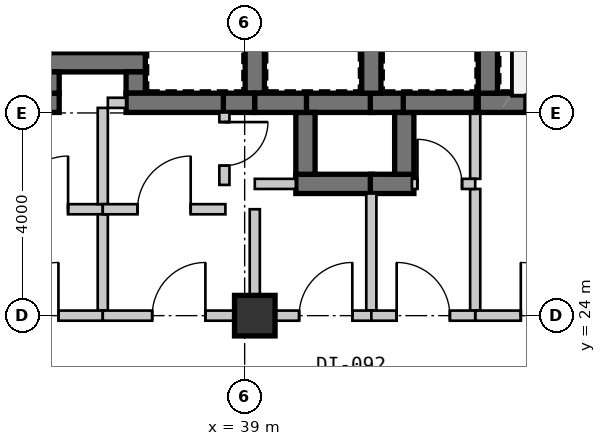
"""IFC4 building model, lengths in metres.
Left out: names, types, materials, properties, quantities, classifications, styles, units other than length and angle.
Written with IfcOpenShell. Run it as: python <this file> out.ifc"""

import sys

from ifc_helpers import new_model, si_unit, direction, frame, frame_2d, origin, origin_2d, place, context, subcontext, project, spatial, rectangle, extrude, source, transform, mapped, element, fill, save


model = new_model("IFC4")
c1 = context("Model", 3, precision=1e-05, world=origin(), true_north=direction((0.0, 1.0)))
c2 = subcontext(c1, "Body", "Model", "MODEL_VIEW")
j1 = project(units=[si_unit("LENGTHUNIT", "METRE"), si_unit("PLANEANGLEUNIT", "RADIAN")], contexts=[c1])
p1 = place(None, origin())
s1 = spatial("IfcSite", under=j1, at=p1, CompositionType="ELEMENT")
p2 = place(p1, origin())
s2 = spatial("IfcBuilding", under=s1, at=p2, CompositionType="ELEMENT")
p3 = place(p2, frame((0.0, 0.0, 26.25)))
s3 = spatial("IfcBuildingStorey", under=s2, at=p3, CompositionType="ELEMENT", Elevation=26.25)
m1 = source(origin(), c2, "Body", "SweptSolid", [
    extrude(rectangle(XDim=0.8, YDim=0.8, at=origin_2d()), origin(), (0.0, 0.0, 1.0), 3.15),
])
p4 = place(p3, frame((39.2, 24.0, 0.0), z_axis=(0.0, 0.0, 1.0), x_axis=(1.0, 0.0, 0.0)))
e1 = element("IfcColumn", 1, at=p4, inside=s3, PredefinedType="COLUMN", context=c2, shape_type="MappedRepresentation", body=[
    mapped(m1, transform((0.0, 0.0, 0.0), scale=1.0)),
])
m2 = source(origin(), c2, "Body", "SweptSolid", [
    extrude(rectangle(XDim=2.98, YDim=0.38, at=frame_2d((1.49, 0.0))), origin(), (0.0, 0.0, 1.0), 2.93),
])
p5 = place(p3, frame((43.61, 28.2, 0.0), z_axis=(0.0, 0.0, 1.0), x_axis=(1.0, 0.0, 0.0)))
e2 = element("IfcWall", 2, at=p5, inside=s3, PredefinedType="SHEAR", context=c2, shape_type="MappedRepresentation", body=[
    mapped(m2, transform((0.0, 0.0, 0.0), scale=1.0)),
])
m3 = source(origin(), c2, "Body", "SweptSolid", [
    extrude(rectangle(XDim=1.1, YDim=2.15, at=frame_2d((0.55, 1.075))), frame((0.0, 0.2, 0.0), z_axis=(0.0, -1.0, 0.0), x_axis=(1.0, 0.0, 0.0)), (0.0, 0.0, 1.0), 0.4),
])
p6 = place(p5, frame((0.94, 0.0, 0.0)))
e3 = element("IfcOpeningElement", 3, at=p6, cuts=e2, PredefinedType="OPENING", context=c2, shape_type="MappedRepresentation", body=[
    mapped(m3, transform((0.0, 0.0, 0.0), scale=1.0)),
])
m4 = source(origin(), c2, "Body", "SweptSolid", [
    extrude(rectangle(XDim=3.42, YDim=0.38, at=frame_2d((1.71, 0.0))), origin(), (0.0, 0.0, 1.0), 2.93),
])
p7 = place(p3, frame((43.8, 31.81, 0.0), z_axis=(0.0, 0.0, 1.0), x_axis=(0.0, -1.0, 0.0)))
e4 = element("IfcWall", 4, at=p7, inside=s3, PredefinedType="SHEAR", context=c2, shape_type="MappedRepresentation", body=[
    mapped(m4, transform((0.0, 0.0, 0.0), scale=1.0)),
])
m5 = source(origin(), c2, "Body", "SweptSolid", [
    extrude(rectangle(XDim=2.4, YDim=0.2, at=frame_2d((1.2, 0.0))), origin(), (0.0, 0.0, 1.0), 2.93),
])
p8 = place(p3, frame((43.55, 26.5, 0.0), z_axis=(0.0, 0.0, 1.0), x_axis=(0.0, -1.0, 0.0)))
e5 = element("IfcWall", 5, at=p8, inside=s3, PredefinedType="SOLIDWALL", context=c2, shape_type="MappedRepresentation", body=[
    mapped(m5, transform((0.0, 0.0, 0.0), scale=1.0)),
])
m6 = source(origin(), c2, "Body", "SweptSolid", [
    extrude(rectangle(XDim=1.31, YDim=0.2, at=frame_2d((0.655, 0.0))), origin(), (0.0, 0.0, 1.0), 2.93),
])
p9 = place(p3, frame((43.55, 28.01, 0.0), z_axis=(0.0, 0.0, 1.0), x_axis=(0.0, -1.0, 0.0)))
e6 = element("IfcWall", 6, at=p9, inside=s3, PredefinedType="SOLIDWALL", context=c2, shape_type="MappedRepresentation", body=[
    mapped(m6, transform((0.0, 0.0, 0.0), scale=1.0)),
])
m7 = source(origin(), c2, "Body", "SweptSolid", [
    extrude(rectangle(XDim=2.66, YDim=0.2, at=frame_2d((1.33, 0.0))), origin(), (0.0, 0.0, 1.0), 2.397),
])
p10 = place(p3, frame((43.55, 24.0, 0.0), z_axis=(0.0, 0.0, 1.0), x_axis=(1.0, 0.0, 0.0)))
e7 = element("IfcWall", 7, at=p10, inside=s3, PredefinedType="SOLIDWALL", context=c2, shape_type="MappedRepresentation", body=[
    mapped(m7, transform((0.0, 0.0, 0.0), scale=1.0)),
])
m8 = source(origin(), c2, "Body", "SweptSolid", [
    extrude(rectangle(XDim=1.05, YDim=2.1, at=frame_2d((0.525, 1.05))), frame((0.0, 0.11, 0.0), z_axis=(0.0, -1.0, 0.0), x_axis=(1.0, 0.0, 0.0)), (0.0, 0.0, 1.0), 0.22),
])
p11 = place(p10, frame((0.9, 0.0, 0.0)))
e8 = element("IfcOpeningElement", 8, at=p11, cuts=e7, PredefinedType="OPENING", context=c2, shape_type="MappedRepresentation", body=[
    mapped(m8, transform((0.0, 0.0, 0.0), scale=1.0)),
])
m9 = source(origin(), c2, "Body", "SweptSolid", [
    extrude(rectangle(XDim=1.12, YDim=0.38, at=frame_2d((0.56, 0.0))), origin(), (0.0, 0.0, 1.0), 2.93),
])
for number, where, z_axis, x_axis in (
    (9, (35.15, 30.31, 0.0), (0.0, 0.0, 1.0), (0.0, -1.0, 0.0)),
    (10, (36.85, 29.19, 0.0), (0.0, 0.0, 1.0), (0.0, 1.0, 0.0)),
):
    element("IfcWall", number, at=place(p3, frame(where, z_axis=z_axis, x_axis=x_axis)), inside=s3, PredefinedType="SHEAR", context=c2, shape_type="MappedRepresentation", body=[
        mapped(m9, transform((0.0, 0.0, 0.0), scale=1.0)),
    ])
m10 = source(origin(), c2, "Body", "SweptSolid", [
    extrude(rectangle(XDim=2.08, YDim=0.38, at=frame_2d((1.04, 0.0))), origin(), (0.0, 0.0, 1.0), 2.93),
])
p12 = place(p3, frame((34.96, 29.0, 0.0), z_axis=(0.0, 0.0, 1.0), x_axis=(1.0, 0.0, 0.0)))
e11 = element("IfcWall", 11, at=p12, inside=s3, PredefinedType="SHEAR", context=c2, shape_type="MappedRepresentation", body=[
    mapped(m10, transform((0.0, 0.0, 0.0), scale=1.0)),
])
m11 = source(origin(), c2, "Body", "SweptSolid", [
    extrude(rectangle(XDim=1.32, YDim=0.38, at=frame_2d((0.66, 0.0))), origin(), (0.0, 0.0, 1.0), 2.93),
])
p13 = place(p3, frame((41.52, 28.2, 0.0), z_axis=(0.0, 0.0, 1.0), x_axis=(-1.0, 0.0, 0.0)))
e12 = element("IfcWall", 12, at=p13, inside=s3, PredefinedType="SHEAR", context=c2, shape_type="MappedRepresentation", body=[
    mapped(m11, transform((0.0, 0.0, 0.0), scale=1.0)),
])
m12 = source(origin(), c2, "Body", "SweptSolid", [
    extrude(rectangle(XDim=0.67, YDim=0.38, at=frame_2d((0.335, 0.0))), origin(), (0.0, 0.0, 1.0), 2.93),
])
p14 = place(p3, frame((42.15, 28.2, 0.0), z_axis=(0.0, 0.0, 1.0), x_axis=(-1.0, 0.0, 0.0)))
e13 = element("IfcWall", 13, at=p14, inside=s3, PredefinedType="SHEAR", context=c2, shape_type="MappedRepresentation", body=[
    mapped(m12, transform((0.0, 0.0, 0.0), scale=1.0)),
])
m13 = source(origin(), c2, "Body", "SweptSolid", [
    extrude(rectangle(XDim=1.51, YDim=0.38, at=frame_2d((0.755, 0.0))), origin(), (0.0, 0.0, 1.0), 2.93),
])
p15 = place(p3, frame((40.01, 26.6, 0.0), z_axis=(0.0, 0.0, 1.0), x_axis=(1.0, 0.0, 0.0)))
e14 = element("IfcWall", 14, at=p15, inside=s3, PredefinedType="SHEAR", context=c2, shape_type="MappedRepresentation", body=[
    mapped(m13, transform((0.0, 0.0, 0.0), scale=1.0)),
])
m14 = source(origin(), c2, "Body", "SweptSolid", [
    extrude(rectangle(XDim=1.22, YDim=0.38, at=frame_2d((0.61, 0.0))), origin(), (0.0, 0.0, 1.0), 2.93),
])
p16 = place(p3, frame((40.2, 28.01, 0.0), z_axis=(0.0, 0.0, 1.0), x_axis=(0.0, -1.0, 0.0)))
e15 = element("IfcWall", 15, at=p16, inside=s3, PredefinedType="SHEAR", context=c2, shape_type="MappedRepresentation", body=[
    mapped(m14, transform((0.0, 0.0, 0.0), scale=1.0)),
])
m15 = source(origin(), c2, "Body", "SweptSolid", [
    extrude(rectangle(XDim=0.86, YDim=0.38, at=frame_2d((0.43, 0.0))), origin(), (0.0, 0.0, 1.0), 2.93),
])
p17 = place(p3, frame((41.48, 26.6, 0.0), z_axis=(0.0, 0.0, 1.0), x_axis=(1.0, 0.0, 0.0)))
e16 = element("IfcWall", 16, at=p17, inside=s3, PredefinedType="SHEAR", context=c2, shape_type="MappedRepresentation", body=[
    mapped(m15, transform((0.0, 0.0, 0.0), scale=1.0)),
])
p18 = place(p3, frame((42.15, 26.79, 0.0), z_axis=(0.0, 0.0, 1.0), x_axis=(0.0, 1.0, 0.0)))
e17 = element("IfcWall", 17, at=p18, inside=s3, PredefinedType="SHEAR", context=c2, shape_type="MappedRepresentation", body=[
    mapped(m14, transform((0.0, 0.0, 0.0), scale=1.0)),
])
m16 = source(origin(), c2, "Body", "SweptSolid", [
    extrude(rectangle(XDim=1.56, YDim=0.38, at=frame_2d((0.78, 0.0))), origin(), (0.0, 0.0, 1.0), 2.93),
])
p19 = place(p3, frame((33.78, 28.2, 0.0), z_axis=(0.0, 0.0, 1.0), x_axis=(1.0, 0.0, 0.0)))
e18 = element("IfcWall", 18, at=p19, inside=s3, PredefinedType="SHEAR", context=c2, shape_type="MappedRepresentation", body=[
    mapped(m16, transform((0.0, 0.0, 0.0), scale=1.0)),
])
m17 = source(origin(), c2, "Body", "SweptSolid", [
    extrude(rectangle(XDim=0.42, YDim=0.38, at=frame_2d((0.21, 0.0))), origin(), (0.0, 0.0, 1.0), 2.93),
])
p20 = place(p3, frame((35.15, 28.39, 0.0), z_axis=(0.0, 0.0, 1.0), x_axis=(0.0, 1.0, 0.0)))
e19 = element("IfcWall", 19, at=p20, inside=s3, PredefinedType="SHEAR", context=c2, shape_type="MappedRepresentation", body=[
    mapped(m17, transform((0.0, 0.0, 0.0), scale=1.0)),
])
p21 = place(p3, frame((39.2, 28.39, 0.0), z_axis=(0.0, 0.0, 1.0), x_axis=(0.0, 1.0, 0.0)))
e20 = element("IfcWall", 20, at=p21, inside=s3, PredefinedType="SHEAR", context=c2, shape_type="MappedRepresentation", body=[
    mapped(m4, transform((0.0, 0.0, 0.0), scale=1.0)),
])
p22 = place(p3, frame((36.85, 28.81, 0.0), z_axis=(0.0, 0.0, 1.0), x_axis=(0.0, -1.0, 0.0)))
e21 = element("IfcWall", 21, at=p22, inside=s3, PredefinedType="SHEAR", context=c2, shape_type="MappedRepresentation", body=[
    mapped(m17, transform((0.0, 0.0, 0.0), scale=1.0)),
])
m18 = source(origin(), c2, "Body", "SweptSolid", [
    extrude(rectangle(XDim=1.96, YDim=0.38, at=frame_2d((0.98, 0.0))), origin(), (0.0, 0.0, 1.0), 2.93),
])
p23 = place(p3, frame((36.66, 28.2, 0.0), z_axis=(0.0, 0.0, 1.0), x_axis=(1.0, 0.0, 0.0)))
e22 = element("IfcWall", 22, at=p23, inside=s3, PredefinedType="SHEAR", context=c2, shape_type="MappedRepresentation", body=[
    mapped(m18, transform((0.0, 0.0, 0.0), scale=1.0)),
])
m19 = source(origin(), c2, "Body", "SweptSolid", [
    extrude(rectangle(XDim=0.62, YDim=0.38, at=frame_2d((0.31, 0.0))), origin(), (0.0, 0.0, 1.0), 2.93),
])
p24 = place(p3, frame((38.58, 28.2, 0.0), z_axis=(0.0, 0.0, 1.0), x_axis=(1.0, 0.0, 0.0)))
e23 = element("IfcWall", 23, at=p24, inside=s3, PredefinedType="SHEAR", context=c2, shape_type="MappedRepresentation", body=[
    mapped(m19, transform((0.0, 0.0, 0.0), scale=1.0)),
])
p25 = place(p3, frame((41.5, 28.39, 0.0), z_axis=(0.0, 0.0, 1.0), x_axis=(0.0, 1.0, 0.0)))
e24 = element("IfcWall", 24, at=p25, inside=s3, PredefinedType="SHEAR", context=c2, shape_type="MappedRepresentation", body=[
    mapped(m4, transform((0.0, 0.0, 0.0), scale=1.0)),
])
m20 = source(origin(), c2, "Body", "SweptSolid", [
    extrude(rectangle(XDim=1.02, YDim=0.38, at=frame_2d((0.51, 0.0))), origin(), (0.0, 0.0, 1.0), 2.93),
])
p26 = place(p3, frame((39.2, 28.2, 0.0), z_axis=(0.0, 0.0, 1.0), x_axis=(1.0, 0.0, 0.0)))
e25 = element("IfcWall", 25, at=p26, inside=s3, PredefinedType="SHEAR", context=c2, shape_type="MappedRepresentation", body=[
    mapped(m20, transform((0.0, 0.0, 0.0), scale=1.0)),
])
m21 = source(origin(), c2, "Body", "SweptSolid", [
    extrude(rectangle(XDim=1.44, YDim=0.38, at=frame_2d((0.72, 0.0))), origin(), (0.0, 0.0, 1.0), 2.93),
])
p27 = place(p3, frame((42.13, 28.2, 0.0), z_axis=(0.0, 0.0, 1.0), x_axis=(1.0, 0.0, 0.0)))
e26 = element("IfcWall", 26, at=p27, inside=s3, PredefinedType="SHEAR", context=c2, shape_type="MappedRepresentation", body=[
    mapped(m21, transform((0.0, 0.0, 0.0), scale=1.0)),
])
m22 = source(origin(), c2, "Body", "SweptSolid", [
    extrude(rectangle(XDim=2.42, YDim=0.2, at=frame_2d((1.21, 0.0))), origin(), (0.0, 0.0, 1.0), 2.93),
])
p28 = place(p3, frame((33.78, 26.1, 0.0), z_axis=(0.0, 0.0, 1.0), x_axis=(1.0, 0.0, 0.0)))
e27 = element("IfcWall", 27, at=p28, inside=s3, PredefinedType="SOLIDWALL", context=c2, shape_type="MappedRepresentation", body=[
    mapped(m22, transform((0.0, 0.0, 0.0), scale=1.0)),
])
p29 = place(p28, frame((0.685, 0.0, 0.0)))
e28 = element("IfcOpeningElement", 28, at=p29, cuts=e27, PredefinedType="OPENING", context=c2, shape_type="MappedRepresentation", body=[
    mapped(m8, transform((0.0, 0.0, 0.0), scale=1.0)),
])
m23 = source(origin(), c2, "Body", "SweptSolid", [
    extrude(rectangle(XDim=1.9, YDim=0.2, at=frame_2d((0.95, 0.0))), origin(), (0.0, 0.0, 1.0), 2.93),
])
p30 = place(p3, frame((36.2, 26.0, 0.0), z_axis=(0.0, 0.0, 1.0), x_axis=(0.0, -1.0, 0.0)))
e29 = element("IfcWall", 29, at=p30, inside=s3, PredefinedType="SOLIDWALL", context=c2, shape_type="MappedRepresentation", body=[
    mapped(m23, transform((0.0, 0.0, 0.0), scale=1.0)),
])
m24 = source(origin(), c2, "Body", "SweptSolid", [
    extrude(rectangle(XDim=2.8, YDim=0.2, at=frame_2d((1.4, 0.0))), origin(), (0.0, 0.0, 1.0), 2.47),
])
p31 = place(p3, frame((36.2, 24.0, 0.0), z_axis=(0.0, 0.0, 1.0), x_axis=(-1.0, 0.0, 0.0)))
e30 = element("IfcWall", 30, at=p31, inside=s3, PredefinedType="SOLIDWALL", context=c2, shape_type="MappedRepresentation", body=[
    mapped(m24, transform((0.0, 0.0, 0.0), scale=1.0)),
])
p32 = place(p31, frame((0.875, 0.0, 0.0)))
e31 = element("IfcOpeningElement", 31, at=p32, cuts=e30, PredefinedType="OPENING", context=c2, shape_type="MappedRepresentation", body=[
    mapped(m8, transform((0.0, 0.0, 0.0), scale=1.0)),
])
m25 = source(origin(), c2, "Body", "SweptSolid", [
    extrude(rectangle(XDim=1.9, YDim=0.2, at=frame_2d((0.95, 0.0))), origin(), (0.0, 0.0, 1.0), 2.93),
])
p33 = place(p3, frame((36.2, 28.1, 0.0), z_axis=(0.0, 0.0, 1.0), x_axis=(0.0, -1.0, 0.0)))
e32 = element("IfcWall", 32, at=p33, inside=s3, PredefinedType="SOLIDWALL", context=c2, shape_type="MappedRepresentation", body=[
    mapped(m25, transform((0.0, 0.0, 0.0), scale=1.0)),
])
m26 = source(origin(), c2, "Body", "SweptSolid", [
    extrude(rectangle(XDim=0.36, YDim=0.2, at=frame_2d((0.18, 0.0))), origin(), (0.0, 0.0, 1.0), 2.93),
])
p34 = place(p3, frame((36.66, 28.2, 0.0), z_axis=(0.0, 0.0, 1.0), x_axis=(-1.0, 0.0, 0.0)))
e33 = element("IfcWall", 33, at=p34, inside=s3, PredefinedType="SOLIDWALL", context=c2, shape_type="MappedRepresentation", body=[
    mapped(m26, transform((0.0, 0.0, 0.0), scale=1.0)),
])
m27 = source(origin(), c2, "Body", "SweptSolid", [
    extrude(rectangle(XDim=2.42, YDim=0.2, at=frame_2d((1.21, 0.0))), origin(), (0.0, 0.0, 1.0), 2.93),
])
p35 = place(p3, frame((36.2, 26.1, 0.0), z_axis=(0.0, 0.0, 1.0), x_axis=(1.0, 0.0, 0.0)))
e34 = element("IfcWall", 34, at=p35, inside=s3, PredefinedType="SOLIDWALL", context=c2, shape_type="MappedRepresentation", body=[
    mapped(m27, transform((0.0, 0.0, 0.0), scale=1.0)),
])
p36 = place(p35, frame((0.685, 0.0, 0.0)))
e35 = element("IfcOpeningElement", 35, at=p36, cuts=e34, PredefinedType="OPENING", context=c2, shape_type="MappedRepresentation", body=[
    mapped(m8, transform((0.0, 0.0, 0.0), scale=1.0)),
])
m28 = source(origin(), c2, "Body", "SweptSolid", [
    extrude(rectangle(XDim=2.0, YDim=0.2, at=frame_2d((1.0, 0.0))), origin(), (0.0, 0.0, 1.0), 2.47),
])
p37 = place(p3, frame((39.2, 26.1, 0.0), z_axis=(0.0, 0.0, 1.0), x_axis=(0.0, -1.0, 0.0)))
e36 = element("IfcWall", 36, at=p37, inside=s3, PredefinedType="SOLIDWALL", context=c2, shape_type="MappedRepresentation", body=[
    mapped(m28, transform((0.0, 0.0, 0.0), scale=1.0)),
])
m29 = source(origin(), c2, "Body", "SweptSolid", [
    extrude(rectangle(XDim=3.0, YDim=0.2, at=frame_2d((1.5, 0.0))), origin(), (0.0, 0.0, 1.0), 2.47),
])
p38 = place(p3, frame((39.2, 24.0, 0.0), z_axis=(0.0, 0.0, 1.0), x_axis=(-1.0, 0.0, 0.0)))
e37 = element("IfcWall", 37, at=p38, inside=s3, PredefinedType="SOLIDWALL", context=c2, shape_type="MappedRepresentation", body=[
    mapped(m29, transform((0.0, 0.0, 0.0), scale=1.0)),
])
p39 = place(p38, frame((0.975, 0.0, 0.0)))
e38 = element("IfcOpeningElement", 38, at=p39, cuts=e37, PredefinedType="OPENING", context=c2, shape_type="MappedRepresentation", body=[
    mapped(m8, transform((0.0, 0.0, 0.0), scale=1.0)),
])
m30 = source(origin(), c2, "Body", "SweptSolid", [
    extrude(rectangle(XDim=1.43, YDim=0.2, at=frame_2d((0.715, 0.0))), origin(), (0.0, 0.0, 1.0), 2.93),
])
p40 = place(p3, frame((38.6, 28.01, 0.0), z_axis=(0.0, 0.0, 1.0), x_axis=(0.0, -1.0, 0.0)))
e39 = element("IfcWall", 39, at=p40, inside=s3, PredefinedType="SOLIDWALL", context=c2, shape_type="MappedRepresentation", body=[
    mapped(m30, transform((0.0, 0.0, 0.0), scale=1.0)),
])
m31 = source(origin(), c2, "Body", "SweptSolid", [
    extrude(rectangle(XDim=0.86, YDim=2.1, at=frame_2d((0.43, 1.05))), frame((0.0, 0.11, 0.0), z_axis=(0.0, -1.0, 0.0), x_axis=(1.0, 0.0, 0.0)), (0.0, 0.0, 1.0), 0.22),
])
p41 = place(p40, frame((0.19, 0.0, 0.0)))
e40 = element("IfcOpeningElement", 40, at=p41, cuts=e39, PredefinedType="OPENING", context=c2, shape_type="MappedRepresentation", body=[
    mapped(m31, transform((0.0, 0.0, 0.0), scale=1.0)),
])
m32 = source(origin(), c2, "Body", "SweptSolid", [
    extrude(rectangle(XDim=0.81, YDim=0.2, at=frame_2d((0.405, 0.0))), origin(), (0.0, 0.0, 1.0), 2.93),
])
p42 = place(p3, frame((39.2, 26.6, 0.0), z_axis=(0.0, 0.0, 1.0), x_axis=(1.0, 0.0, 0.0)))
e41 = element("IfcWall", 41, at=p42, inside=s3, PredefinedType="SOLIDWALL", context=c2, shape_type="MappedRepresentation", body=[
    mapped(m32, transform((0.0, 0.0, 0.0), scale=1.0)),
])
m33 = source(origin(), c2, "Body", "SweptSolid", [
    extrude(rectangle(XDim=2.31, YDim=0.2, at=frame_2d((1.155, 0.0))), origin(), (0.0, 0.0, 1.0), 2.93),
])
p43 = place(p3, frame((41.5, 26.41, 0.0), z_axis=(0.0, 0.0, 1.0), x_axis=(0.0, -1.0, 0.0)))
e42 = element("IfcWall", 42, at=p43, inside=s3, PredefinedType="SOLIDWALL", context=c2, shape_type="MappedRepresentation", body=[
    mapped(m33, transform((0.0, 0.0, 0.0), scale=1.0)),
])
m34 = source(origin(), c2, "Body", "SweptSolid", [
    extrude(rectangle(XDim=2.3, YDim=0.2, at=frame_2d((1.15, 0.0))), origin(), (0.0, 0.0, 1.0), 2.397),
])
p44 = place(p3, frame((41.5, 24.0, 0.0), z_axis=(0.0, 0.0, 1.0), x_axis=(-1.0, 0.0, 0.0)))
e43 = element("IfcWall", 43, at=p44, inside=s3, PredefinedType="SOLIDWALL", context=c2, shape_type="MappedRepresentation", body=[
    mapped(m34, transform((0.0, 0.0, 0.0), scale=1.0)),
])
p45 = place(p44, frame((0.375, 0.0, 0.0)))
e44 = element("IfcOpeningElement", 44, at=p45, cuts=e43, PredefinedType="OPENING", context=c2, shape_type="MappedRepresentation", body=[
    mapped(m8, transform((0.0, 0.0, 0.0), scale=1.0)),
])
m35 = source(origin(), c2, "Body", "SweptSolid", [
    extrude(rectangle(XDim=1.25, YDim=0.2, at=frame_2d((0.625, 0.0))), origin(), (0.0, 0.0, 1.0), 2.93),
])
p46 = place(p3, frame((42.3, 26.6, 0.0), z_axis=(0.0, 0.0, 1.0), x_axis=(1.0, 0.0, 0.0)))
e45 = element("IfcWall", 45, at=p46, inside=s3, PredefinedType="SOLIDWALL", context=c2, shape_type="MappedRepresentation", body=[
    mapped(m35, transform((0.0, 0.0, 0.0), scale=1.0)),
])
m36 = source(origin(), c2, "Body", "SweptSolid", [
    extrude(rectangle(XDim=0.88, YDim=2.1, at=frame_2d((0.44, 1.05))), frame((0.0, 0.11, 0.0), z_axis=(0.0, -1.0, 0.0), x_axis=(1.0, 0.0, 0.0)), (0.0, 0.0, 1.0), 0.22),
])
p47 = place(p46, frame((0.11, 0.0, 0.0)))
e46 = element("IfcOpeningElement", 46, at=p47, cuts=e45, PredefinedType="OPENING", context=c2, shape_type="MappedRepresentation", body=[
    mapped(m36, transform((0.0, 0.0, 0.0), scale=1.0)),
])
m37 = source(origin(), c2, "Body", "SweptSolid", [
    extrude(rectangle(XDim=2.05, YDim=0.2, at=frame_2d((1.025, 0.0))), origin(), (0.0, 0.0, 1.0), 2.397),
])
p48 = place(p3, frame((43.55, 24.0, 0.0), z_axis=(0.0, 0.0, 1.0), x_axis=(-1.0, 0.0, 0.0)))
e47 = element("IfcWall", 47, at=p48, inside=s3, PredefinedType="SOLIDWALL", context=c2, shape_type="MappedRepresentation", body=[
    mapped(m37, transform((0.0, 0.0, 0.0), scale=1.0)),
])
p49 = place(p48, frame((0.5, 0.0, 0.0)))
e48 = element("IfcOpeningElement", 48, at=p49, cuts=e47, PredefinedType="OPENING", context=c2, shape_type="MappedRepresentation", body=[
    mapped(m8, transform((0.0, 0.0, 0.0), scale=1.0)),
])
m38 = source(origin(), c2, "Body", "SweptSolid", [
    extrude(rectangle(XDim=1.05, YDim=2.1, at=frame_2d((0.525, 1.05))), frame((0.0, 0.025, 0.0), z_axis=(0.0, -1.0, 0.0), x_axis=(1.0, 0.0, 0.0)), (0.0, 0.0, 1.0), 0.05),
])
p50 = place(p11, origin())
e49 = element("IfcDoor", 49, at=p50, inside=s3, OperationType="SINGLE_SWING_LEFT", PredefinedType="DOOR", context=c2, shape_type="MappedRepresentation", body=[
    mapped(m38, transform((0.0, 0.0, 0.0), scale=1.0)),
])
fill(e8, e49)
p51 = place(p29, origin())
e50 = element("IfcDoor", 50, at=p51, inside=s3, OperationType="SINGLE_SWING_RIGHT", PredefinedType="DOOR", context=c2, shape_type="MappedRepresentation", body=[
    mapped(m38, transform((0.0, 0.0, 0.0), scale=1.0)),
])
fill(e28, e50)
p52 = place(p32, frame((1.05, 0.0, 0.0), z_axis=(0.0, 0.0, 1.0), x_axis=(-1.0, 0.0, 0.0)))
e51 = element("IfcDoor", 51, at=p52, inside=s3, OperationType="SINGLE_SWING_RIGHT", PredefinedType="DOOR", context=c2, shape_type="MappedRepresentation", body=[
    mapped(m38, transform((0.0, 0.0, 0.0), scale=1.0)),
])
fill(e31, e51)
p53 = place(p36, origin())
e52 = element("IfcDoor", 52, at=p53, inside=s3, OperationType="SINGLE_SWING_RIGHT", PredefinedType="DOOR", context=c2, shape_type="MappedRepresentation", body=[
    mapped(m38, transform((0.0, 0.0, 0.0), scale=1.0)),
])
fill(e35, e52)
p54 = place(p39, frame((1.05, 0.0, 0.0), z_axis=(0.0, 0.0, 1.0), x_axis=(-1.0, 0.0, 0.0)))
e53 = element("IfcDoor", 53, at=p54, inside=s3, OperationType="SINGLE_SWING_RIGHT", PredefinedType="DOOR", context=c2, shape_type="MappedRepresentation", body=[
    mapped(m38, transform((0.0, 0.0, 0.0), scale=1.0)),
])
fill(e38, e53)
p55 = place(p45, frame((1.05, 0.0, 0.0), z_axis=(0.0, 0.0, 1.0), x_axis=(-1.0, 0.0, 0.0)))
e54 = element("IfcDoor", 54, at=p55, inside=s3, OperationType="SINGLE_SWING_RIGHT", PredefinedType="DOOR", context=c2, shape_type="MappedRepresentation", body=[
    mapped(m38, transform((0.0, 0.0, 0.0), scale=1.0)),
])
fill(e44, e54)
m39 = source(origin(), c2, "Body", "SweptSolid", [
    extrude(rectangle(XDim=0.88, YDim=2.1, at=frame_2d((0.44, 1.05))), frame((0.0, 0.025, 0.0), z_axis=(0.0, -1.0, 0.0), x_axis=(1.0, 0.0, 0.0)), (0.0, 0.0, 1.0), 0.05),
])
p56 = place(p47, origin())
e55 = element("IfcDoor", 55, at=p56, inside=s3, OperationType="SINGLE_SWING_LEFT", PredefinedType="DOOR", context=c2, shape_type="MappedRepresentation", body=[
    mapped(m39, transform((0.0, 0.0, 0.0), scale=1.0)),
])
fill(e46, e55)
p57 = place(p49, frame((1.05, 0.0, 0.0), z_axis=(0.0, 0.0, 1.0), x_axis=(-1.0, 0.0, 0.0)))
e56 = element("IfcDoor", 56, at=p57, inside=s3, OperationType="SINGLE_SWING_LEFT", PredefinedType="DOOR", context=c2, shape_type="MappedRepresentation", body=[
    mapped(m38, transform((0.0, 0.0, 0.0), scale=1.0)),
])
fill(e48, e56)
m40 = source(origin(), c2, "Body", "SweptSolid", [
    extrude(rectangle(XDim=0.86, YDim=2.1, at=frame_2d((0.43, 1.05))), frame((0.0, 0.025, 0.0), z_axis=(0.0, -1.0, 0.0), x_axis=(1.0, 0.0, 0.0)), (0.0, 0.0, 1.0), 0.05),
])
p58 = place(p41, origin())
e57 = element("IfcDoor", 57, at=p58, inside=s3, OperationType="SINGLE_SWING_LEFT", PredefinedType="DOOR", context=c2, shape_type="MappedRepresentation", body=[
    mapped(m40, transform((0.0, 0.0, 0.0), scale=1.0)),
])
fill(e40, e57)
save(model, sys.argv[1])
